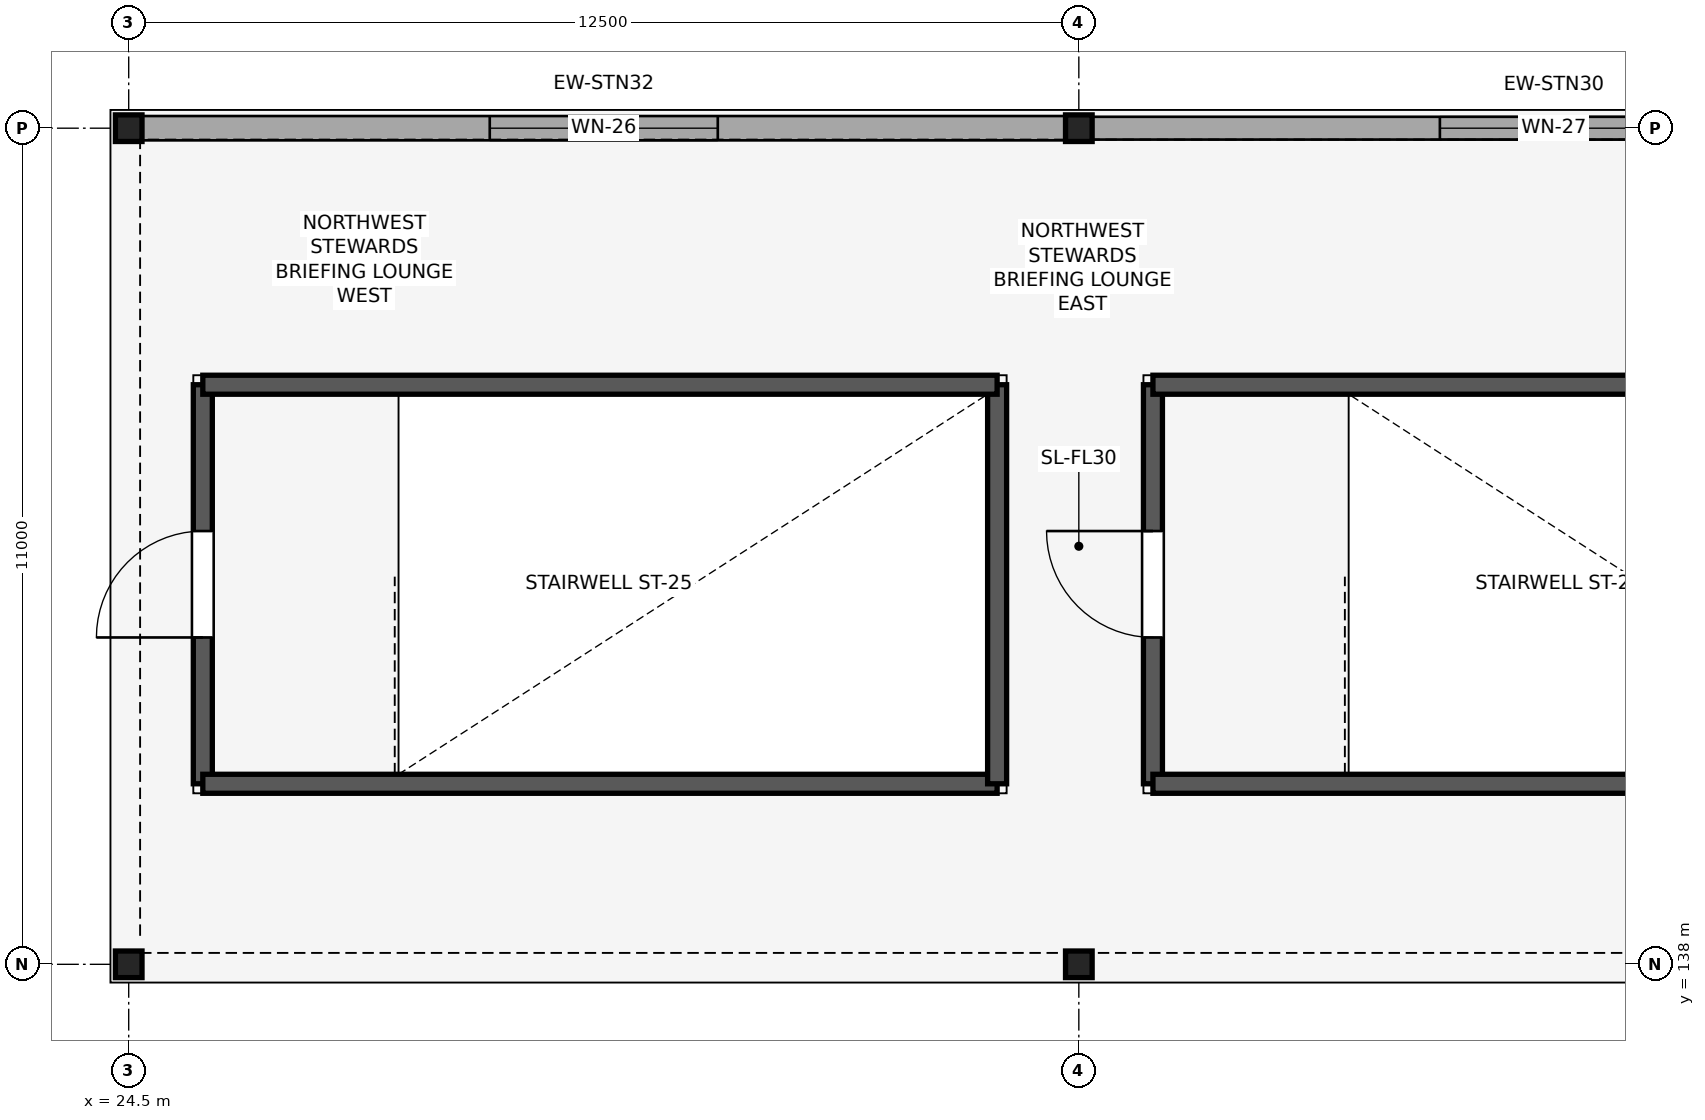
"""IFC4 building model, lengths in metres.
Left out: names, types, materials, properties, quantities, classifications, styles, units other than length and angle.
Written with IfcOpenShell. Run it as: python <this file> out.ifc"""

import sys

from ifc_helpers import new_model, si_unit, direction, frame, frame_2d, origin, origin_2d, place, context, subcontext, project, spatial, rectangle, hollow_rectangle, extrude, element, fill, save


model = new_model("IFC4")
c1 = context("Model", 3, precision=1e-05, world=origin(), true_north=direction((0.0, 1.0)))
c2 = subcontext(c1, "Body", "Model", "MODEL_VIEW")
j1 = project(units=[si_unit("LENGTHUNIT", "METRE"), si_unit("PLANEANGLEUNIT", "RADIAN")], contexts=[c1])
p1 = place(None, origin())
s1 = spatial("IfcSite", under=j1, at=p1, CompositionType="ELEMENT")
p2 = place(p1, origin())
s2 = spatial("IfcBuilding", under=s1, at=p2, CompositionType="ELEMENT")
p3 = place(p2, frame((0.0, 0.0, 5.4)))
s3 = spatial("IfcBuildingStorey", under=s2, at=p3, CompositionType="ELEMENT", Elevation=5.4)
for number, where, z_axis, x_axis in (
    (1, (24.5, 138.0, 0.0), (0.0, 0.0, 1.0), (1.0, 0.0, 0.0)),
    (2, (24.5, 149.0, 0.0), (0.0, 0.0, 1.0), (1.0, 0.0, 0.0)),
    (3, (37.0, 138.0, 0.0), (0.0, 0.0, 1.0), (1.0, 0.0, 0.0)),
    (4, (37.0, 149.0, 0.0), (0.0, 0.0, 1.0), (1.0, 0.0, 0.0)),
):
    element("IfcColumn", number, at=place(p3, frame(where, z_axis=z_axis, x_axis=x_axis)), inside=s3, PredefinedType="COLUMN", context=c2, shape_type="SweptSolid", body=[
        extrude(hollow_rectangle(XDim=0.35, YDim=0.35, WallThickness=0.02, at=origin_2d()), origin(), (0.0, 0.0, 1.0), 5.2),
    ])
p4 = place(p3, frame((24.672, 149.0, 0.0), z_axis=(0.0, 0.0, 1.0), x_axis=(1.0, 0.0, 0.0)))
e5 = element("IfcWall", 5, at=p4, inside=s3, PredefinedType="STANDARD", context=c2, shape_type="SweptSolid", body=[
    extrude(rectangle(XDim=12.156, YDim=0.32, at=frame_2d((6.078, 0.0))), origin(), (0.0, 0.0, 1.0), 4.3),
])
p5 = place(p4, frame((4.578, 0.0, 0.95)))
e6 = element("IfcOpeningElement", 6, at=p5, cuts=e5, PredefinedType="OPENING", context=c2, shape_type="SweptSolid", body=[
    extrude(rectangle(XDim=3.0, YDim=1.6, at=frame_2d((1.5, 0.8))), frame((0.0, 0.17, 0.0), z_axis=(0.0, -1.0, 0.0), x_axis=(1.0, 0.0, 0.0)), (0.0, 0.0, 1.0), 0.34),
])
p6 = place(p3, frame((37.172, 149.0, 0.0), z_axis=(0.0, 0.0, 1.0), x_axis=(1.0, 0.0, 0.0)))
e7 = element("IfcWall", 7, at=p6, inside=s3, PredefinedType="STANDARD", context=c2, shape_type="SweptSolid", body=[
    extrude(rectangle(XDim=12.156, YDim=0.3, at=frame_2d((6.078, 0.0))), origin(), (0.0, 0.0, 1.0), 4.3),
])
p7 = place(p6, frame((4.578, 0.0, 0.95)))
e8 = element("IfcOpeningElement", 8, at=p7, cuts=e7, PredefinedType="OPENING", context=c2, shape_type="SweptSolid", body=[
    extrude(rectangle(XDim=3.0, YDim=1.85, at=frame_2d((1.5, 0.925))), frame((0.0, 0.16, 0.0), z_axis=(0.0, -1.0, 0.0), x_axis=(1.0, 0.0, 0.0)), (0.0, 0.0, 1.0), 0.32),
])
p8 = place(p3, frame((25.475, 145.625, 0.0), z_axis=(0.0, 0.0, 1.0), x_axis=(0.0, -1.0, 0.0)))
e9 = element("IfcWall", 9, at=p8, inside=s3, PredefinedType="SHEAR", context=c2, shape_type="SweptSolid", body=[
    extrude(rectangle(XDim=5.25, YDim=0.25, at=frame_2d((2.625, 0.0))), origin(), (0.0, 0.0, 1.0), 3.2),
])
p9 = place(p8, frame((1.925, 0.0, 0.0)))
e10 = element("IfcOpeningElement", 10, at=p9, cuts=e9, PredefinedType="OPENING", context=c2, shape_type="SweptSolid", body=[
    extrude(rectangle(XDim=1.4, YDim=2.2, at=frame_2d((0.7, 1.1))), frame((0.0, 0.135, 0.0), z_axis=(0.0, -1.0, 0.0), x_axis=(1.0, 0.0, 0.0)), (0.0, 0.0, 1.0), 0.27),
])
p10 = place(p3, frame((25.475, 140.375, 0.0), z_axis=(0.0, 0.0, 1.0), x_axis=(1.0, 0.0, 0.0)))
e11 = element("IfcWall", 11, at=p10, inside=s3, PredefinedType="SHEAR", context=c2, shape_type="SweptSolid", body=[
    extrude(rectangle(XDim=10.45, YDim=0.25, at=frame_2d((5.225, 0.0))), origin(), (0.0, 0.0, 1.0), 3.2),
])
p11 = place(p3, frame((35.925, 140.375, 0.0), z_axis=(0.0, 0.0, 1.0), x_axis=(0.0, 1.0, 0.0)))
e12 = element("IfcWall", 12, at=p11, inside=s3, PredefinedType="SHEAR", context=c2, shape_type="SweptSolid", body=[
    extrude(rectangle(XDim=5.25, YDim=0.25, at=frame_2d((2.625, 0.0))), origin(), (0.0, 0.0, 1.0), 3.2),
])
p12 = place(p3, frame((35.925, 145.625, 0.0), z_axis=(0.0, 0.0, 1.0), x_axis=(-1.0, 0.0, 0.0)))
e13 = element("IfcWall", 13, at=p12, inside=s3, PredefinedType="SHEAR", context=c2, shape_type="SweptSolid", body=[
    extrude(rectangle(XDim=10.45, YDim=0.25, at=frame_2d((5.225, 0.0))), origin(), (0.0, 0.0, 1.0), 3.2),
])
p13 = place(p3, frame((37.975, 145.625, 0.0), z_axis=(0.0, 0.0, 1.0), x_axis=(0.0, -1.0, 0.0)))
e14 = element("IfcWall", 14, at=p13, inside=s3, PredefinedType="SHEAR", context=c2, shape_type="SweptSolid", body=[
    extrude(rectangle(XDim=5.25, YDim=0.25, at=frame_2d((2.625, 0.0))), origin(), (0.0, 0.0, 1.0), 3.2),
])
p14 = place(p13, frame((1.925, 0.0, 0.0)))
e15 = element("IfcOpeningElement", 15, at=p14, cuts=e14, PredefinedType="OPENING", context=c2, shape_type="SweptSolid", body=[
    extrude(rectangle(XDim=1.4, YDim=2.2, at=frame_2d((0.7, 1.1))), frame((0.0, 0.135, 0.0), z_axis=(0.0, -1.0, 0.0), x_axis=(1.0, 0.0, 0.0)), (0.0, 0.0, 1.0), 0.27),
])
for number, where, z_axis, x_axis in (
    (16, (37.975, 140.375, 0.0), (0.0, 0.0, 1.0), (1.0, 0.0, 0.0)),
    (17, (48.425, 145.625, 0.0), (0.0, 0.0, 1.0), (-1.0, 0.0, 0.0)),
):
    element("IfcWall", number, at=place(p3, frame(where, z_axis=z_axis, x_axis=x_axis)), inside=s3, PredefinedType="SHEAR", context=c2, shape_type="SweptSolid", body=[
        extrude(rectangle(XDim=10.45, YDim=0.25, at=frame_2d((5.225, 0.0))), origin(), (0.0, 0.0, 1.0), 3.2),
    ])
p15 = place(p5, origin())
e18 = element("IfcWindow", 18, at=p15, inside=s3, PartitioningType="SINGLE_PANEL", PredefinedType="WINDOW", context=c2, shape_type="SweptSolid", body=[
    extrude(rectangle(XDim=3.0, YDim=1.6, at=frame_2d((1.5, 0.8))), frame((0.0, 0.03, 0.0), z_axis=(0.0, -1.0, 0.0), x_axis=(1.0, 0.0, 0.0)), (0.0, 0.0, 1.0), 0.06),
])
fill(e6, e18)
p16 = place(p7, origin())
e19 = element("IfcWindow", 19, at=p16, inside=s3, PartitioningType="SINGLE_PANEL", PredefinedType="WINDOW", context=c2, shape_type="SweptSolid", body=[
    extrude(rectangle(XDim=3.0, YDim=1.85, at=frame_2d((1.5, 0.925))), frame((0.0, 0.03, 0.0), z_axis=(0.0, -1.0, 0.0), x_axis=(1.0, 0.0, 0.0)), (0.0, 0.0, 1.0), 0.06),
])
fill(e8, e19)
p17 = place(p9, frame((1.4, 0.0, 0.0), z_axis=(0.0, 0.0, 1.0), x_axis=(-1.0, 0.0, 0.0)))
e20 = element("IfcDoor", 20, at=p17, inside=s3, OperationType="SINGLE_SWING_LEFT", PredefinedType="DOOR", context=c2, shape_type="SweptSolid", body=[
    extrude(rectangle(XDim=1.4, YDim=2.2, at=frame_2d((0.7, 1.1))), frame((0.0, 0.025, 0.0), z_axis=(0.0, -1.0, 0.0), x_axis=(1.0, 0.0, 0.0)), (0.0, 0.0, 1.0), 0.05),
])
fill(e10, e20)
p18 = place(p14, frame((1.4, 0.0, 0.0), z_axis=(0.0, 0.0, 1.0), x_axis=(-1.0, 0.0, 0.0)))
e21 = element("IfcDoor", 21, at=p18, inside=s3, OperationType="SINGLE_SWING_RIGHT", PredefinedType="DOOR", context=c2, shape_type="SweptSolid", body=[
    extrude(rectangle(XDim=1.4, YDim=2.2, at=frame_2d((0.7, 1.1))), frame((0.0, 0.025, 0.0), z_axis=(0.0, -1.0, 0.0), x_axis=(1.0, 0.0, 0.0)), (0.0, 0.0, 1.0), 0.05),
])
fill(e15, e21)
save(model, sys.argv[1])
